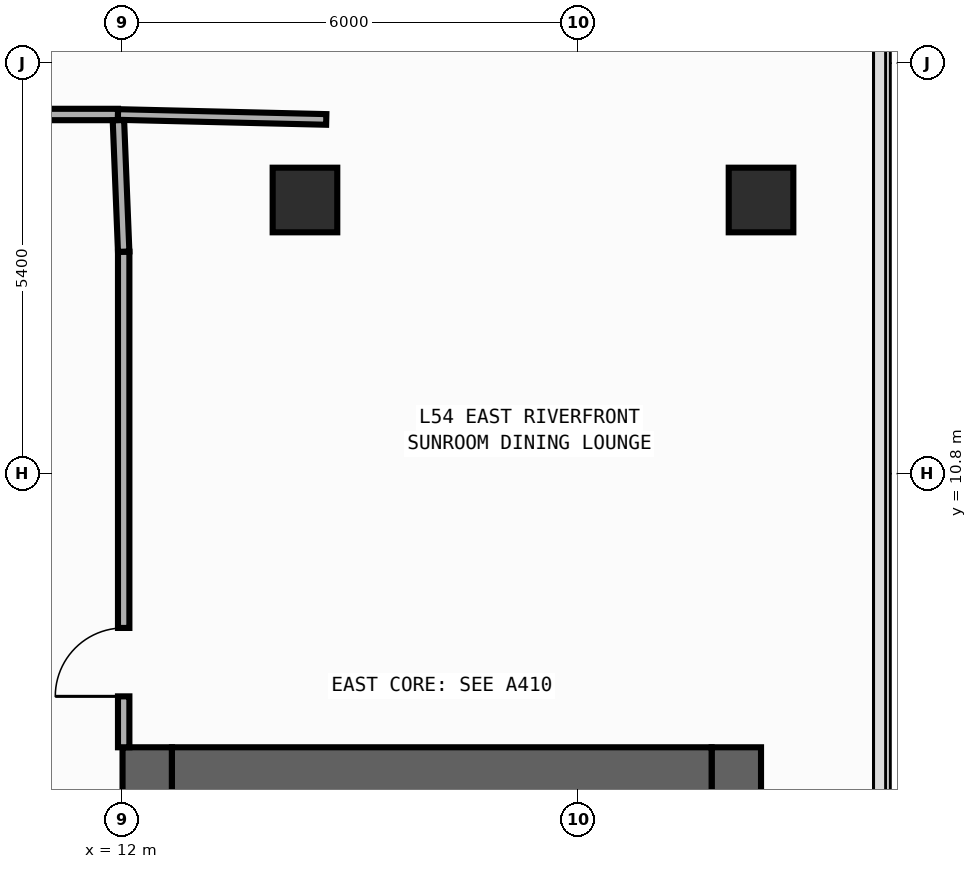
"""IFC4 building model, lengths in metres.
Left out: names, types, materials, properties, quantities, classifications, styles, units other than length and angle.
Written with IfcOpenShell. Run it as: python <this file> out.ifc"""

import sys

from ifc_helpers import new_model, si_unit, direction, frame, frame_2d, origin, origin_2d, place, context, subcontext, project, spatial, rectangle, extrude, element, fill, save


model = new_model("IFC4")
c1 = context("Model", 3, precision=1e-05, world=origin(), true_north=direction((0.0, 1.0)))
c2 = subcontext(c1, "Body", "Model", "MODEL_VIEW")
j1 = project(units=[si_unit("LENGTHUNIT", "METRE"), si_unit("PLANEANGLEUNIT", "RADIAN")], contexts=[c1])
p1 = place(None, origin())
s1 = spatial("IfcSite", under=j1, at=p1, CompositionType="ELEMENT")
p2 = place(p1, origin())
s2 = spatial("IfcBuilding", under=s1, at=p2, CompositionType="ELEMENT")
p3 = place(p2, frame((0.0, 0.0, 233.2)))
s3 = spatial("IfcBuildingStorey", under=s2, at=p3, CompositionType="ELEMENT", Elevation=233.2)
p4 = place(p3, frame((12.325, -19.8, 0.0), z_axis=(0.0, 0.0, 1.0), x_axis=(0.0, 1.0, 0.0)))
e1 = element("IfcWall", 1, at=p4, inside=s3, PredefinedType="SHEAR", context=c2, shape_type="SweptSolid", body=[
    extrude(rectangle(XDim=27.0, YDim=0.65, at=frame_2d((13.5, 0.0))), origin(), (0.0, 0.0, 1.0), 3.34),
])
p5 = place(p4, frame((23.05, 0.0, 0.0)))
e2 = element("IfcOpeningElement", 2, at=p5, cuts=e1, PredefinedType="OPENING", context=c2, shape_type="SweptSolid", body=[
    extrude(rectangle(XDim=1.1, YDim=2.2, at=frame_2d((0.55, 1.1))), frame((0.0, 0.335, 0.0), z_axis=(0.0, -1.0, 0.0), x_axis=(1.0, 0.0, 0.0)), (0.0, 0.0, 1.0), 0.67),
])
p6 = place(p4, frame((19.85, 0.0, 0.0)))
e3 = element("IfcOpeningElement", 3, at=p6, cuts=e1, PredefinedType="OPENING", context=c2, shape_type="SweptSolid", body=[
    extrude(rectangle(XDim=1.1, YDim=2.2, at=frame_2d((0.55, 1.1))), frame((0.0, 0.335, 0.0), z_axis=(0.0, -1.0, 0.0), x_axis=(1.0, 0.0, 0.0)), (0.0, 0.0, 1.0), 0.67),
])
p7 = place(p4, frame((16.65, 0.0, 0.0)))
e4 = element("IfcOpeningElement", 4, at=p7, cuts=e1, PredefinedType="OPENING", context=c2, shape_type="SweptSolid", body=[
    extrude(rectangle(XDim=1.1, YDim=2.2, at=frame_2d((0.55, 1.1))), frame((0.0, 0.335, 0.0), z_axis=(0.0, -1.0, 0.0), x_axis=(1.0, 0.0, 0.0)), (0.0, 0.0, 1.0), 0.67),
])
p8 = place(p4, frame((6.275, 0.0, 0.0)))
e5 = element("IfcOpeningElement", 5, at=p8, cuts=e1, PredefinedType="OPENING", context=c2, shape_type="SweptSolid", body=[
    extrude(rectangle(XDim=0.85, YDim=2.1, at=frame_2d((0.425, 1.05))), frame((0.0, 0.335, 0.0), z_axis=(0.0, -1.0, 0.0), x_axis=(1.0, 0.0, 0.0)), (0.0, 0.0, 1.0), 0.67),
])
p9 = place(p4, frame((8.575, 0.0, 0.0)))
e6 = element("IfcOpeningElement", 6, at=p9, cuts=e1, PredefinedType="OPENING", context=c2, shape_type="SweptSolid", body=[
    extrude(rectangle(XDim=0.85, YDim=2.1, at=frame_2d((0.425, 1.05))), frame((0.0, 0.335, 0.0), z_axis=(0.0, -1.0, 0.0), x_axis=(1.0, 0.0, 0.0)), (0.0, 0.0, 1.0), 0.67),
])
p10 = place(p4, frame((10.675, 0.0, 0.0)))
e7 = element("IfcOpeningElement", 7, at=p10, cuts=e1, PredefinedType="OPENING", context=c2, shape_type="SweptSolid", body=[
    extrude(rectangle(XDim=0.85, YDim=2.1, at=frame_2d((0.425, 1.05))), frame((0.0, 0.335, 0.0), z_axis=(0.0, -1.0, 0.0), x_axis=(1.0, 0.0, 0.0)), (0.0, 0.0, 1.0), 0.67),
])
p11 = place(p4, frame((12.725, 0.0, 0.0)))
e8 = element("IfcOpeningElement", 8, at=p11, cuts=e1, PredefinedType="OPENING", context=c2, shape_type="SweptSolid", body=[
    extrude(rectangle(XDim=1.15, YDim=2.2, at=frame_2d((0.575, 1.1))), frame((0.0, 0.335, 0.0), z_axis=(0.0, -1.0, 0.0), x_axis=(1.0, 0.0, 0.0)), (0.0, 0.0, 1.0), 0.67),
])
p12 = place(p4, frame((25.125, 0.0, 0.0)))
e9 = element("IfcOpeningElement", 9, at=p12, cuts=e1, PredefinedType="OPENING", context=c2, shape_type="SweptSolid", body=[
    extrude(rectangle(XDim=0.85, YDim=2.1, at=frame_2d((0.425, 1.05))), frame((0.0, 0.335, 0.0), z_axis=(0.0, -1.0, 0.0), x_axis=(1.0, 0.0, 0.0)), (0.0, 0.0, 1.0), 0.67),
])
p13 = place(p3, frame((20.075, -19.8, 0.0), z_axis=(0.0, 0.0, 1.0), x_axis=(0.0, 1.0, 0.0)))
e10 = element("IfcWall", 10, at=p13, inside=s3, PredefinedType="SHEAR", context=c2, shape_type="SweptSolid", body=[
    extrude(rectangle(XDim=27.0, YDim=0.65, at=frame_2d((13.5, 0.0))), origin(), (0.0, 0.0, 1.0), 3.34),
])
p14 = place(p3, frame((12.65, 6.875, 0.0), z_axis=(0.0, 0.0, 1.0), x_axis=(1.0, 0.0, 0.0)))
e11 = element("IfcWall", 11, at=p14, inside=s3, PredefinedType="SHEAR", context=c2, shape_type="SweptSolid", body=[
    extrude(rectangle(XDim=7.1, YDim=0.65, at=frame_2d((3.55, 0.0))), origin(), (0.0, 0.0, 1.0), 3.34),
])
for number, where, z_axis, x_axis in (
    (12, (20.4, 14.4, 0.0), (0.0, 0.0, 1.0), (1.0, 0.0, 0.0)),
    (13, (14.4, 14.4, 0.0), (0.0, 0.0, 1.0), (1.0, 0.0, 0.0)),
):
    element("IfcColumn", number, at=place(p3, frame(where, z_axis=z_axis, x_axis=x_axis)), inside=s3, PredefinedType="COLUMN", context=c2, shape_type="SweptSolid", body=[
        extrude(rectangle(XDim=0.85, YDim=0.85, at=origin_2d()), origin(), (0.0, 0.0, 1.0), 3.6),
    ])
p15 = place(p3, frame((12.015, 7.2, 0.0), z_axis=(0.0, 0.0, 1.0), x_axis=(0.0, 1.0, 0.0)))
e14 = element("IfcWall", 14, at=p15, inside=s3, PredefinedType="PARTITIONING", context=c2, shape_type="SweptSolid", body=[
    extrude(rectangle(XDim=6.52, YDim=0.15, at=frame_2d((3.26, 0.0))), origin(), (0.0, 0.0, 1.0), 3.34),
])
p16 = place(p15, frame((0.67, 0.0, 0.0)))
e15 = element("IfcOpeningElement", 15, at=p16, cuts=e14, PredefinedType="OPENING", context=c2, shape_type="SweptSolid", body=[
    extrude(rectangle(XDim=0.9, YDim=2.15, at=frame_2d((0.45, 1.075))), frame((0.0, 0.085, 0.0), z_axis=(0.0, -1.0, 0.0), x_axis=(1.0, 0.0, 0.0)), (0.0, 0.0, 1.0), 0.17),
])
p17 = place(p3, frame((10.56, 15.525, 0.0), z_axis=(0.0, 0.0, 1.0), x_axis=(1.0, 0.0, 0.0)))
e16 = element("IfcWall", 16, at=p17, inside=s3, PredefinedType="PARTITIONING", context=c2, shape_type="SweptSolid", body=[
    extrude(rectangle(XDim=1.38, YDim=0.15, at=frame_2d((0.69, 0.0))), origin(), (0.0, 0.0, 1.0), 3.34),
])
p18 = place(p3, frame((12.015, 13.72, 0.0), z_axis=(0.0, 0.0, 1.0), x_axis=(-0.040046877756, 0.99919780203, 0.0)))
e17 = element("IfcWall", 17, at=p18, inside=s3, PredefinedType="PARTITIONING", context=c2, shape_type="SweptSolid", body=[
    extrude(rectangle(XDim=1.731, YDim=0.15, at=frame_2d((0.866, 0.0))), origin(), (0.0, 0.0, 1.0), 3.34),
])
p19 = place(p3, frame((11.94, 15.525, 0.0), z_axis=(0.0, 0.0, 1.0), x_axis=(0.999719241816, -0.023694673289, 0.0)))
e18 = element("IfcWall", 18, at=p19, inside=s3, PredefinedType="PARTITIONING", context=c2, shape_type="SweptSolid", body=[
    extrude(rectangle(XDim=2.741, YDim=0.14, at=frame_2d((1.37, 0.0))), origin(), (0.0, 0.0, 1.0), 3.34),
])
p20 = place(p16, origin())
e19 = element("IfcDoor", 19, at=p20, inside=s3, OperationType="SINGLE_SWING_LEFT", PredefinedType="DOOR", context=c2, shape_type="SweptSolid", body=[
    extrude(rectangle(XDim=0.9, YDim=2.15, at=frame_2d((0.45, 1.075))), frame((0.0, 0.025, 0.0), z_axis=(0.0, -1.0, 0.0), x_axis=(1.0, 0.0, 0.0)), (0.0, 0.0, 1.0), 0.05),
])
fill(e15, e19)
save(model, sys.argv[1])
